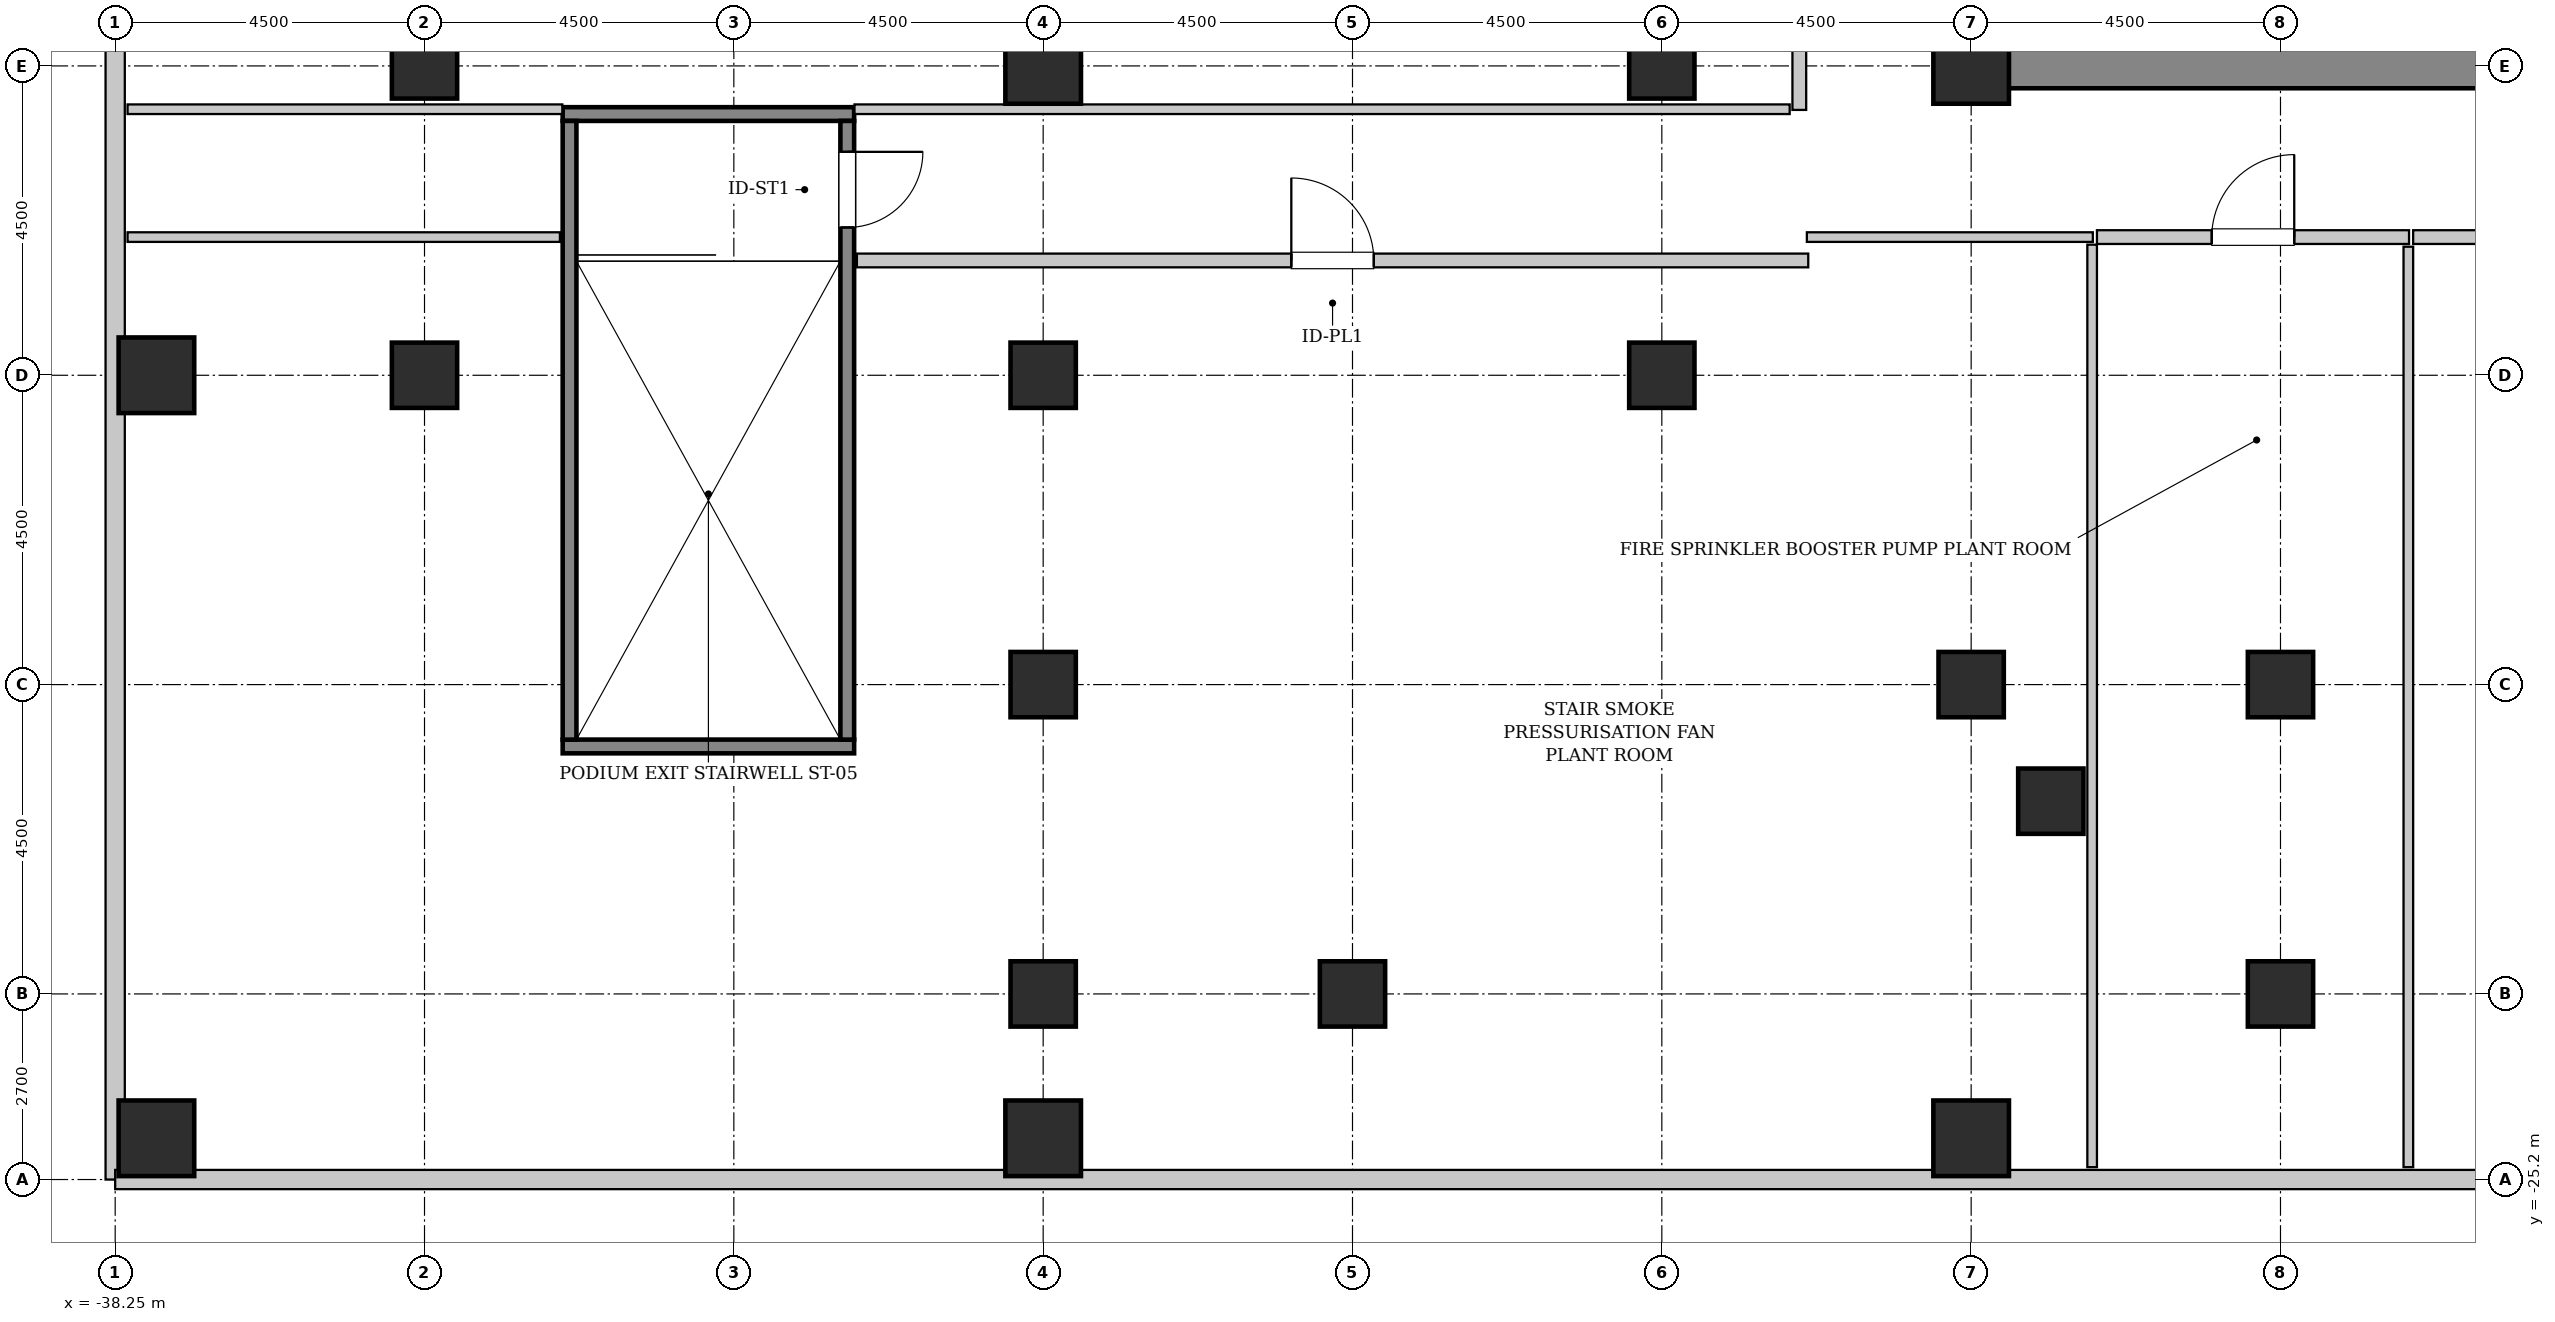
"""IFC4 building model, lengths in metres.
Left out: names, types, materials, properties, quantities, classifications, styles, units other than length and angle.
Written with IfcOpenShell. Run it as: python <this file> out.ifc"""

import sys

from ifc_helpers import new_model, si_unit, direction, frame, frame_2d, origin, origin_2d, place, context, subcontext, project, spatial, rectangle, hollow_rectangle, extrude, source, transform, mapped, element, fill, save


model = new_model("IFC4")
c1 = context("Model", 3, precision=1e-05, world=origin(), true_north=direction((0.0, 1.0)))
c2 = subcontext(c1, "Body", "Model", "MODEL_VIEW")
j1 = project(units=[si_unit("LENGTHUNIT", "METRE"), si_unit("PLANEANGLEUNIT", "RADIAN")], contexts=[c1])
p1 = place(None, origin())
s1 = spatial("IfcSite", under=j1, at=p1, CompositionType="ELEMENT")
p2 = place(p1, origin())
s2 = spatial("IfcBuilding", under=s1, at=p2, CompositionType="ELEMENT")
p3 = place(p2, frame((0.0, 0.0, 27.6)))
s3 = spatial("IfcBuildingStorey", under=s2, at=p3, CompositionType="ELEMENT", Elevation=27.6)
m1 = source(origin(), c2, "Body", "SweptSolid", [
    extrude(rectangle(XDim=10.025, YDim=0.65, at=frame_2d((5.012, 0.0))), origin(), (0.0, 0.0, 1.0), 5.4),
])
p4 = place(p3, frame((-11.575, -9.0, 0.0), z_axis=(0.0, 0.0, 1.0), x_axis=(1.0, 0.0, 0.0)))
e1 = element("IfcWall", 1, at=p4, inside=s3, PredefinedType="SHEAR", context=c2, shape_type="MappedRepresentation", body=[
    mapped(m1, transform((0.0, 0.0, 0.0), x_axis=(1.0, 0.0, 0.0), y_axis=(0.0, 1.0, 0.0), z_axis=(0.0, 0.0, 1.0), scale=1.0)),
])
m2 = source(origin(), c2, "Body", "SweptSolid", [
    extrude(hollow_rectangle(XDim=1.1, YDim=1.1, WallThickness=0.055, InnerFilletRadius=0.055, OuterFilletRadius=0.11, at=origin_2d()), origin(), (0.0, 0.0, 1.0), 5.4),
])
for number, where, z_axis, x_axis in (
    (2, (-37.65, -24.6, 0.0), (0.0, 0.0, 1.0), (1.0, 0.0, 0.0)),
    (3, (-37.65, -13.5, 0.0), (0.0, 0.0, 1.0), (1.0, 0.0, 0.0)),
    (4, (-24.75, -24.6, 0.0), (0.0, 0.0, 1.0), (1.0, 0.0, 0.0)),
):
    element("IfcColumn", number, at=place(p3, frame(where, z_axis=z_axis, x_axis=x_axis)), inside=s3, PredefinedType="COLUMN", context=c2, shape_type="MappedRepresentation", body=[
        mapped(m2, transform((0.0, 0.0, 0.0), x_axis=(1.0, 0.0, 0.0), y_axis=(0.0, 1.0, 0.0), z_axis=(0.0, 0.0, 1.0), scale=1.0)),
    ])
m3 = source(origin(), c2, "Body", "SweptSolid", [
    extrude(hollow_rectangle(XDim=1.1, YDim=1.1, WallThickness=0.055, InnerFilletRadius=0.055, OuterFilletRadius=0.11, at=origin_2d()), origin(), (0.0, 0.0, 1.0), 5.4),
])
p5 = place(p3, frame((-24.75, -9.0, 0.0), z_axis=(0.0, 0.0, 1.0), x_axis=(1.0, 0.0, 0.0)))
e5 = element("IfcColumn", 5, at=p5, inside=s3, PredefinedType="COLUMN", context=c2, shape_type="MappedRepresentation", body=[
    mapped(m3, transform((0.0, 0.0, 0.0), x_axis=(1.0, 0.0, 0.0), y_axis=(0.0, 1.0, 0.0), z_axis=(0.0, 0.0, 1.0), scale=1.0)),
])
p6 = place(p3, frame((-11.25, -24.6, 0.0), z_axis=(0.0, 0.0, 1.0), x_axis=(1.0, 0.0, 0.0)))
e6 = element("IfcColumn", 6, at=p6, inside=s3, PredefinedType="COLUMN", context=c2, shape_type="MappedRepresentation", body=[
    mapped(m2, transform((0.0, 0.0, 0.0), x_axis=(1.0, 0.0, 0.0), y_axis=(0.0, 1.0, 0.0), z_axis=(0.0, 0.0, 1.0), scale=1.0)),
])
p7 = place(p3, frame((-11.25, -9.0, 0.0), z_axis=(0.0, 0.0, 1.0), x_axis=(1.0, 0.0, 0.0)))
e7 = element("IfcColumn", 7, at=p7, inside=s3, PredefinedType="COLUMN", context=c2, shape_type="MappedRepresentation", body=[
    mapped(m3, transform((0.0, 0.0, 0.0), x_axis=(1.0, 0.0, 0.0), y_axis=(0.0, 1.0, 0.0), z_axis=(0.0, 0.0, 1.0), scale=1.0)),
])
m4 = source(origin(), c2, "Body", "SweptSolid", [
    extrude(hollow_rectangle(XDim=0.95, YDim=0.95, WallThickness=0.045, InnerFilletRadius=0.045, OuterFilletRadius=0.09, at=origin_2d()), origin(), (0.0, 0.0, 1.0), 5.4),
])
for number, where, z_axis, x_axis in (
    (8, (-33.75, -13.5, 0.0), (0.0, 0.0, 1.0), (1.0, 0.0, 0.0)),
    (9, (-33.75, -9.0, 0.0), (0.0, 0.0, 1.0), (1.0, 0.0, 0.0)),
    (10, (-24.75, -22.5, 0.0), (0.0, 0.0, 1.0), (1.0, 0.0, 0.0)),
    (11, (-24.75, -18.0, 0.0), (0.0, 0.0, 1.0), (1.0, 0.0, 0.0)),
    (12, (-24.75, -13.5, 0.0), (0.0, 0.0, 1.0), (1.0, 0.0, 0.0)),
    (13, (-20.25, -22.5, 0.0), (0.0, 0.0, 1.0), (1.0, 0.0, 0.0)),
    (14, (-15.75, -13.5, 0.0), (0.0, 0.0, 1.0), (1.0, 0.0, 0.0)),
    (15, (-15.75, -9.0, 0.0), (0.0, 0.0, 1.0), (1.0, 0.0, 0.0)),
    (16, (-11.25, -18.0, 0.0), (0.0, 0.0, 1.0), (1.0, 0.0, 0.0)),
    (17, (-10.091, -19.696, 0.0), (0.0, 0.0, 1.0), (1.0, 0.0, 0.0)),
    (18, (-6.75, -22.5, 0.0), (0.0, 0.0, 1.0), (1.0, 0.0, 0.0)),
    (19, (-6.75, -18.0, 0.0), (0.0, 0.0, 1.0), (1.0, 0.0, 0.0)),
):
    element("IfcColumn", number, at=place(p3, frame(where, z_axis=z_axis, x_axis=x_axis)), inside=s3, PredefinedType="COLUMN", context=c2, shape_type="MappedRepresentation", body=[
        mapped(m4, transform((0.0, 0.0, 0.0), x_axis=(1.0, 0.0, 0.0), y_axis=(0.0, 1.0, 0.0), z_axis=(0.0, 0.0, 1.0), scale=1.0)),
    ])
m5 = source(origin(), c2, "Body", "SweptSolid", [
    extrude(rectangle(XDim=50.4, YDim=0.28, at=frame_2d((25.2, 0.0))), origin(), (0.0, 0.0, 1.0), 5.15),
])
p8 = place(p3, frame((-38.25, 25.2, 0.0), z_axis=(0.0, 0.0, 1.0), x_axis=(0.0, -1.0, 0.0)))
e20 = element("IfcWall", 20, at=p8, inside=s3, PredefinedType="SOLIDWALL", context=c2, shape_type="MappedRepresentation", body=[
    mapped(m5, transform((0.0, 0.0, 0.0), x_axis=(1.0, 0.0, 0.0), y_axis=(0.0, 1.0, 0.0), z_axis=(0.0, 0.0, 1.0), scale=1.0)),
])
m6 = source(origin(), c2, "Body", "SweptSolid", [
    extrude(rectangle(XDim=76.5, YDim=0.28, at=frame_2d((38.25, 0.0))), origin(), (0.0, 0.0, 1.0), 5.15),
])
p9 = place(p3, frame((-38.25, -25.2, 0.0), z_axis=(0.0, 0.0, 1.0), x_axis=(1.0, 0.0, 0.0)))
e21 = element("IfcWall", 21, at=p9, inside=s3, PredefinedType="SOLIDWALL", context=c2, shape_type="MappedRepresentation", body=[
    mapped(m6, transform((0.0, 0.0, 0.0), x_axis=(1.0, 0.0, 0.0), y_axis=(0.0, 1.0, 0.0), z_axis=(0.0, 0.0, 1.0), scale=1.0)),
])
m7 = source(origin(), c2, "Body", "SweptSolid", [
    extrude(rectangle(XDim=4.24, YDim=0.2, at=frame_2d((2.12, 0.0))), origin(), (0.0, 0.0, 1.0), 5.15),
])
for number, where, z_axis, x_axis in (
    (22, (-31.74, -9.7, 0.0), (0.0, 0.0, 1.0), (1.0, 0.0, 0.0)),
    (23, (-31.74, -18.9, 0.0), (0.0, 0.0, 1.0), (1.0, 0.0, 0.0)),
):
    element("IfcWall", number, at=place(p3, frame(where, z_axis=z_axis, x_axis=x_axis)), inside=s3, PredefinedType="SOLIDWALL", context=c2, shape_type="MappedRepresentation", body=[
        mapped(m7, transform((0.0, 0.0, 0.0), x_axis=(1.0, 0.0, 0.0), y_axis=(0.0, 1.0, 0.0), z_axis=(0.0, 0.0, 1.0), scale=1.0)),
    ])
m8 = source(origin(), c2, "Body", "SweptSolid", [
    extrude(rectangle(XDim=9.0, YDim=0.2, at=frame_2d((4.5, 0.0))), origin(), (0.0, 0.0, 1.0), 5.15),
])
p10 = place(p3, frame((-31.64, -9.8, 0.0), z_axis=(0.0, 0.0, 1.0), x_axis=(0.0, -1.0, 0.0)))
e24 = element("IfcWall", 24, at=p10, inside=s3, PredefinedType="SOLIDWALL", context=c2, shape_type="MappedRepresentation", body=[
    mapped(m8, transform((0.0, 0.0, 0.0), x_axis=(1.0, 0.0, 0.0), y_axis=(0.0, 1.0, 0.0), z_axis=(0.0, 0.0, 1.0), scale=1.0)),
])
p11 = place(p3, frame((-27.6, -9.8, 0.0), z_axis=(0.0, 0.0, 1.0), x_axis=(0.0, -1.0, 0.0)))
e25 = element("IfcWall", 25, at=p11, inside=s3, PredefinedType="SOLIDWALL", context=c2, shape_type="MappedRepresentation", body=[
    mapped(m8, transform((0.0, 0.0, 0.0), x_axis=(1.0, 0.0, 0.0), y_axis=(0.0, 1.0, 0.0), z_axis=(0.0, 0.0, 1.0), scale=1.0)),
])
p12 = place(p11, frame((0.45, 0.0, 0.0)))
e26 = element("IfcOpeningElement", 26, at=p12, cuts=e25, PredefinedType="OPENING", context=c2, shape_type="SweptSolid", body=[
    extrude(rectangle(XDim=1.1, YDim=2.15, at=frame_2d((0.55, 1.075))), frame((0.0, 0.11, 0.0), z_axis=(0.0, -1.0, 0.0), x_axis=(1.0, 0.0, 0.0)), (0.0, 0.0, 1.0), 0.22),
])
m9 = source(origin(), c2, "Body", "SweptSolid", [
    extrude(rectangle(XDim=19.28, YDim=0.2, at=frame_2d((9.64, 0.0))), origin(), (0.0, 0.0, 1.0), 5.135),
])
p13 = place(p3, frame((-13.75, -9.64, 0.0), z_axis=(0.0, 0.0, 1.0), x_axis=(0.0, 1.0, 0.0)))
e27 = element("IfcWall", 27, at=p13, inside=s3, PredefinedType="SOLIDWALL", context=c2, shape_type="MappedRepresentation", body=[
    mapped(m9, transform((0.0, 0.0, 0.0), x_axis=(1.0, 0.0, 0.0), y_axis=(0.0, 1.0, 0.0), z_axis=(0.0, 0.0, 1.0), scale=1.0)),
])
p14 = place(p13, frame((9.04, 0.0, 0.0)))
e28 = element("IfcOpeningElement", 28, at=p14, cuts=e27, PredefinedType="OPENING", context=c2, shape_type="SweptSolid", body=[
    extrude(rectangle(XDim=1.2, YDim=2.15, at=frame_2d((0.6, 1.075))), frame((0.0, 0.11, 0.0), z_axis=(0.0, -1.0, 0.0), x_axis=(1.0, 0.0, 0.0)), (0.0, 0.0, 1.0), 0.22),
])
m10 = source(origin(), c2, "Body", "SweptSolid", [
    extrude(rectangle(XDim=6.325, YDim=0.14, at=frame_2d((3.163, 0.0))), origin(), (0.0, 0.0, 1.0), 5.135),
])
p15 = place(p3, frame((-38.07, -9.63, 0.0), z_axis=(0.0, 0.0, 1.0), x_axis=(1.0, 0.0, 0.0)))
e29 = element("IfcWall", 29, at=p15, inside=s3, PredefinedType="PARTITIONING", context=c2, shape_type="MappedRepresentation", body=[
    mapped(m10, transform((0.0, 0.0, 0.0), x_axis=(1.0, 0.0, 0.0), y_axis=(0.0, 1.0, 0.0), z_axis=(0.0, 0.0, 1.0), scale=1.0)),
])
m11 = source(origin(), c2, "Body", "SweptSolid", [
    extrude(rectangle(XDim=13.605, YDim=0.14, at=frame_2d((6.803, 0.0))), origin(), (0.0, 0.0, 1.0), 5.135),
])
p16 = place(p3, frame((-27.495, -9.63, 0.0), z_axis=(0.0, 0.0, 1.0), x_axis=(1.0, 0.0, 0.0)))
e30 = element("IfcWall", 30, at=p16, inside=s3, PredefinedType="PARTITIONING", context=c2, shape_type="MappedRepresentation", body=[
    mapped(m11, transform((0.0, 0.0, 0.0), x_axis=(1.0, 0.0, 0.0), y_axis=(0.0, 1.0, 0.0), z_axis=(0.0, 0.0, 1.0), scale=1.0)),
])
m12 = source(origin(), c2, "Body", "SweptSolid", [
    extrude(rectangle(XDim=13.84, YDim=0.2, at=frame_2d((6.92, 0.0))), origin(), (0.0, 0.0, 1.0), 5.135),
])
p17 = place(p3, frame((-27.46, -11.83, 0.0), z_axis=(0.0, 0.0, 1.0), x_axis=(1.0, 0.0, 0.0)))
e31 = element("IfcWall", 31, at=p17, inside=s3, PredefinedType="SOLIDWALL", context=c2, shape_type="MappedRepresentation", body=[
    mapped(m12, transform((0.0, 0.0, 0.0), x_axis=(1.0, 0.0, 0.0), y_axis=(0.0, 1.0, 0.0), z_axis=(0.0, 0.0, 1.0), scale=1.0)),
])
p18 = place(p17, frame((6.32, 0.0, 0.0)))
e32 = element("IfcOpeningElement", 32, at=p18, cuts=e31, PredefinedType="OPENING", context=c2, shape_type="SweptSolid", body=[
    extrude(rectangle(XDim=1.2, YDim=2.15, at=frame_2d((0.6, 1.075))), frame((0.0, 0.11, 0.0), z_axis=(0.0, -1.0, 0.0), x_axis=(1.0, 0.0, 0.0)), (0.0, 0.0, 1.0), 0.22),
])
m13 = source(origin(), c2, "Body", "SweptSolid", [
    extrude(rectangle(XDim=4.16, YDim=0.14, at=frame_2d((2.08, 0.0))), origin(), (0.0, 0.0, 1.0), 5.135),
])
p19 = place(p3, frame((-13.64, -11.49, 0.0), z_axis=(0.0, 0.0, 1.0), x_axis=(1.0, 0.0, 0.0)))
e33 = element("IfcWall", 33, at=p19, inside=s3, PredefinedType="PARTITIONING", context=c2, shape_type="MappedRepresentation", body=[
    mapped(m13, transform((0.0, 0.0, 0.0), x_axis=(1.0, 0.0, 0.0), y_axis=(0.0, 1.0, 0.0), z_axis=(0.0, 0.0, 1.0), scale=1.0)),
])
m14 = source(origin(), c2, "Body", "SweptSolid", [
    extrude(rectangle(XDim=13.42, YDim=0.14, at=frame_2d((6.71, 0.0))), origin(), (0.0, 0.0, 1.0), 5.135),
])
p20 = place(p3, frame((-9.49, -25.02, 0.0), z_axis=(0.0, 0.0, 1.0), x_axis=(0.0, 1.0, 0.0)))
e34 = element("IfcWall", 34, at=p20, inside=s3, PredefinedType="PARTITIONING", context=c2, shape_type="MappedRepresentation", body=[
    mapped(m14, transform((0.0, 0.0, 0.0), x_axis=(1.0, 0.0, 0.0), y_axis=(0.0, 1.0, 0.0), z_axis=(0.0, 0.0, 1.0), scale=1.0)),
])
m15 = source(origin(), c2, "Body", "SweptSolid", [
    extrude(rectangle(XDim=6.29, YDim=0.14, at=frame_2d((3.145, 0.0))), origin(), (0.0, 0.0, 1.0), 5.135),
])
p21 = place(p3, frame((-38.07, -11.49, 0.0), z_axis=(0.0, 0.0, 1.0), x_axis=(1.0, 0.0, 0.0)))
e35 = element("IfcWall", 35, at=p21, inside=s3, PredefinedType="PARTITIONING", context=c2, shape_type="MappedRepresentation", body=[
    mapped(m15, transform((0.0, 0.0, 0.0), x_axis=(1.0, 0.0, 0.0), y_axis=(0.0, 1.0, 0.0), z_axis=(0.0, 0.0, 1.0), scale=1.0)),
])
m16 = source(origin(), c2, "Body", "SweptSolid", [
    extrude(rectangle(XDim=4.54, YDim=0.2, at=frame_2d((2.27, 0.0))), origin(), (0.0, 0.0, 1.0), 5.135),
])
p22 = place(p3, frame((-9.42, -11.49, 0.0), z_axis=(0.0, 0.0, 1.0), x_axis=(1.0, 0.0, 0.0)))
e36 = element("IfcWall", 36, at=p22, inside=s3, PredefinedType="SOLIDWALL", context=c2, shape_type="MappedRepresentation", body=[
    mapped(m16, transform((0.0, 0.0, 0.0), x_axis=(1.0, 0.0, 0.0), y_axis=(0.0, 1.0, 0.0), z_axis=(0.0, 0.0, 1.0), scale=1.0)),
])
p23 = place(p22, frame((1.67, 0.0, 0.0)))
e37 = element("IfcOpeningElement", 37, at=p23, cuts=e36, PredefinedType="OPENING", context=c2, shape_type="SweptSolid", body=[
    extrude(rectangle(XDim=1.2, YDim=2.15, at=frame_2d((0.6, 1.075))), frame((0.0, 0.11, 0.0), z_axis=(0.0, -1.0, 0.0), x_axis=(1.0, 0.0, 0.0)), (0.0, 0.0, 1.0), 0.22),
])
m17 = source(origin(), c2, "Body", "SweptSolid", [
    extrude(rectangle(XDim=13.39, YDim=0.14, at=frame_2d((6.695, 0.0))), origin(), (0.0, 0.0, 1.0), 5.135),
])
p24 = place(p3, frame((-4.89, -25.02, 0.0), z_axis=(0.0, 0.0, 1.0), x_axis=(0.0, 1.0, 0.0)))
e38 = element("IfcWall", 38, at=p24, inside=s3, PredefinedType="PARTITIONING", context=c2, shape_type="MappedRepresentation", body=[
    mapped(m17, transform((0.0, 0.0, 0.0), x_axis=(1.0, 0.0, 0.0), y_axis=(0.0, 1.0, 0.0), z_axis=(0.0, 0.0, 1.0), scale=1.0)),
])
m18 = source(origin(), c2, "Body", "SweptSolid", [
    extrude(rectangle(XDim=4.79, YDim=0.2, at=frame_2d((2.395, 0.0))), origin(), (0.0, 0.0, 1.0), 5.135),
])
p25 = place(p3, frame((-4.82, -11.49, 0.0), z_axis=(0.0, 0.0, 1.0), x_axis=(1.0, 0.0, 0.0)))
e39 = element("IfcWall", 39, at=p25, inside=s3, PredefinedType="SOLIDWALL", context=c2, shape_type="MappedRepresentation", body=[
    mapped(m18, transform((0.0, 0.0, 0.0), x_axis=(1.0, 0.0, 0.0), y_axis=(0.0, 1.0, 0.0), z_axis=(0.0, 0.0, 1.0), scale=1.0)),
])
p26 = place(p25, frame((1.795, 0.0, 0.0)))
e40 = element("IfcOpeningElement", 40, at=p26, cuts=e39, PredefinedType="OPENING", context=c2, shape_type="SweptSolid", body=[
    extrude(rectangle(XDim=1.2, YDim=2.15, at=frame_2d((0.6, 1.075))), frame((0.0, 0.11, 0.0), z_axis=(0.0, -1.0, 0.0), x_axis=(1.0, 0.0, 0.0)), (0.0, 0.0, 1.0), 0.22),
])
m19 = source(origin(), c2, "Body", "SweptSolid", [
    extrude(rectangle(XDim=1.1, YDim=2.15, at=frame_2d((0.55, 1.075))), frame((0.0, 0.025, 0.0), z_axis=(0.0, -1.0, 0.0), x_axis=(1.0, 0.0, 0.0)), (0.0, 0.0, 1.0), 0.05),
])
p27 = place(p12, origin())
e41 = element("IfcDoor", 41, at=p27, inside=s3, OperationType="SINGLE_SWING_LEFT", PredefinedType="DOOR", context=c2, shape_type="MappedRepresentation", body=[
    mapped(m19, transform((0.0, 0.0, 0.0), x_axis=(1.0, 0.0, 0.0), y_axis=(0.0, 1.0, 0.0), z_axis=(0.0, 0.0, 1.0), scale=1.0)),
])
fill(e26, e41)
m20 = source(origin(), c2, "Body", "SweptSolid", [
    extrude(rectangle(XDim=1.2, YDim=2.15, at=frame_2d((0.6, 1.075))), frame((0.0, 0.025, 0.0), z_axis=(0.0, -1.0, 0.0), x_axis=(1.0, 0.0, 0.0)), (0.0, 0.0, 1.0), 0.05),
])
p28 = place(p18, origin())
e42 = element("IfcDoor", 42, at=p28, inside=s3, OperationType="SINGLE_SWING_LEFT", PredefinedType="DOOR", context=c2, shape_type="MappedRepresentation", body=[
    mapped(m20, transform((0.0, 0.0, 0.0), x_axis=(1.0, 0.0, 0.0), y_axis=(0.0, 1.0, 0.0), z_axis=(0.0, 0.0, 1.0), scale=1.0)),
])
fill(e32, e42)
p29 = place(p23, origin())
e43 = element("IfcDoor", 43, at=p29, inside=s3, OperationType="SINGLE_SWING_RIGHT", PredefinedType="DOOR", context=c2, shape_type="MappedRepresentation", body=[
    mapped(m20, transform((0.0, 0.0, 0.0), x_axis=(1.0, 0.0, 0.0), y_axis=(0.0, 1.0, 0.0), z_axis=(0.0, 0.0, 1.0), scale=1.0)),
])
fill(e37, e43)
save(model, sys.argv[1])
